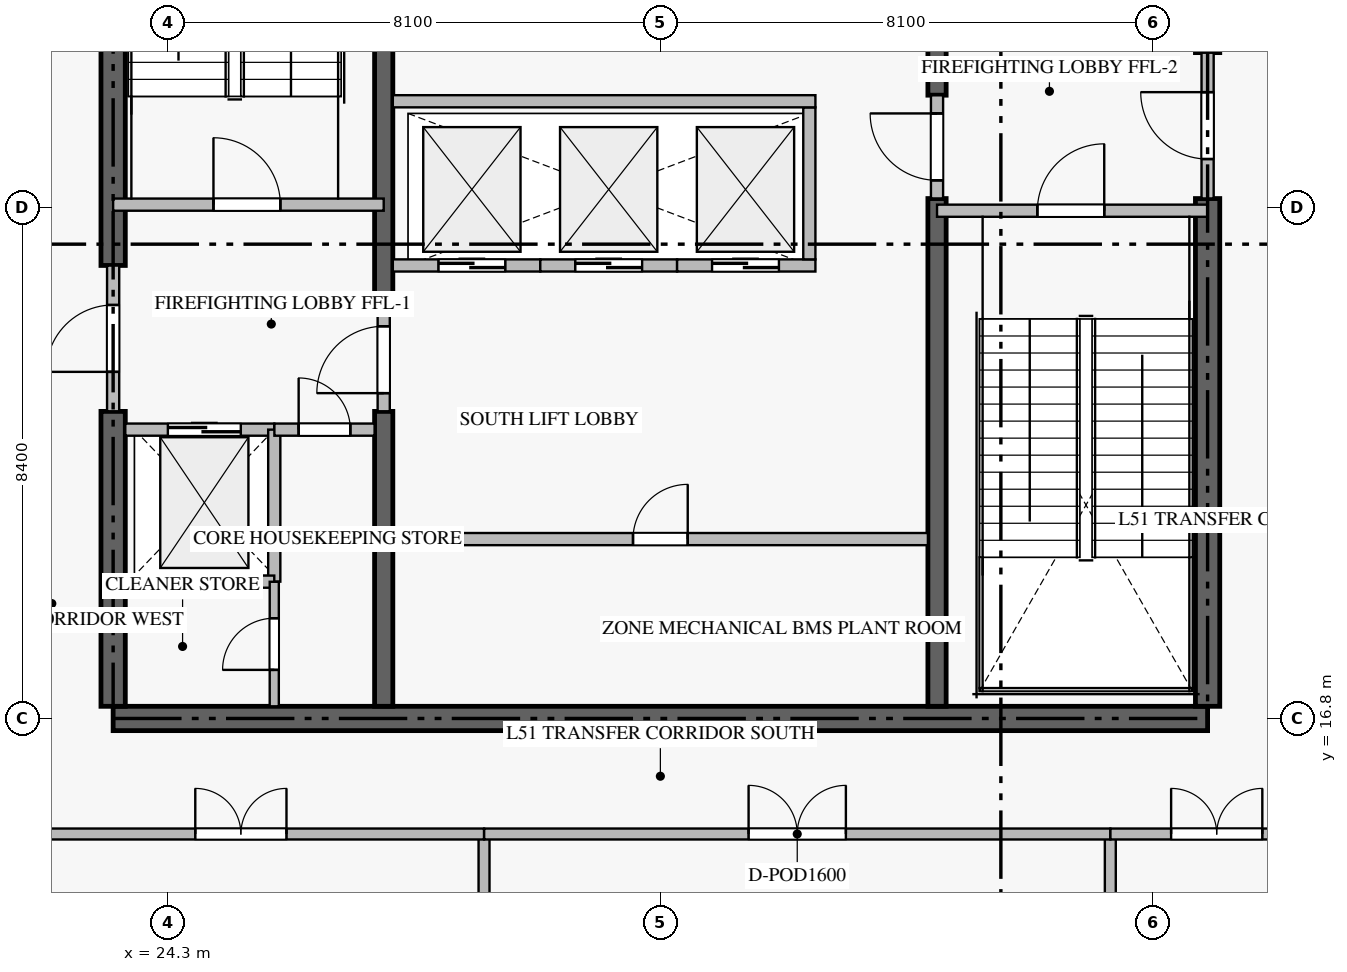
"""IFC4 building model, lengths in metres.
Left out: names, types, materials, properties, quantities, classifications, styles, units other than length and angle.
Written with IfcOpenShell. Run it as: python <this file> out.ifc"""

import sys

from ifc_helpers import new_model, si_unit, direction, frame, frame_2d, origin, place, context, subcontext, project, spatial, rectangle, extrude, source, transform, mapped, element, fill, save


model = new_model("IFC4")
c1 = context("Model", 3, precision=1e-05, world=origin(), true_north=direction((0.0, 1.0)))
c2 = subcontext(c1, "Body", "Model", "MODEL_VIEW")
j1 = project(units=[si_unit("LENGTHUNIT", "METRE"), si_unit("PLANEANGLEUNIT", "RADIAN")], contexts=[c1])
p1 = place(None, origin())
s1 = spatial("IfcSite", under=j1, at=p1, CompositionType="ELEMENT")
p2 = place(p1, origin())
s2 = spatial("IfcBuilding", under=s1, at=p2, CompositionType="ELEMENT")
p3 = place(p2, frame((0.0, 0.0, 204.9)))
s3 = spatial("IfcBuildingStorey", under=s2, at=p3, CompositionType="ELEMENT", Elevation=204.9)
p4 = place(p3, frame((23.4, 16.8, -0.36), z_axis=(0.0, 0.0, 1.0), x_axis=(1.0, 0.0, 0.0)))
e1 = element("IfcWall", 1, at=p4, inside=s3, PredefinedType="SHEAR", context=c2, shape_type="SweptSolid", body=[
    extrude(rectangle(XDim=18.0, YDim=0.4, at=frame_2d((9.0, 0.0))), origin(), (0.0, 0.0, 1.0), 5.468),
])
p5 = place(p3, frame((23.4, 17.0, -0.36), z_axis=(0.0, 0.0, 1.0), x_axis=(0.0, 1.0, 0.0)))
e2 = element("IfcWall", 2, at=p5, inside=s3, PredefinedType="SHEAR", context=c2, shape_type="SweptSolid", body=[
    extrude(rectangle(XDim=4.85, YDim=0.4, at=frame_2d((2.425, 0.0))), origin(), (0.0, 0.0, 1.0), 5.468),
])
p6 = place(p3, frame((23.4, 24.25, -0.36), z_axis=(0.0, 0.0, 1.0), x_axis=(0.0, 1.0, 0.0)))
e3 = element("IfcWall", 3, at=p6, inside=s3, PredefinedType="SHEAR", context=c2, shape_type="SweptSolid", body=[
    extrude(rectangle(XDim=9.15, YDim=0.4, at=frame_2d((4.575, 0.0))), origin(), (0.0, 0.0, 1.0), 5.468),
])
p7 = place(p3, frame((41.4, 17.0, -0.36), z_axis=(0.0, 0.0, 1.0), x_axis=(0.0, 1.0, 0.0)))
e4 = element("IfcWall", 4, at=p7, inside=s3, PredefinedType="SHEAR", context=c2, shape_type="SweptSolid", body=[
    extrude(rectangle(XDim=8.35, YDim=0.4, at=frame_2d((4.175, 0.0))), origin(), (0.0, 0.0, 1.0), 5.468),
])
p8 = place(p3, frame((27.85, 17.0, -0.36), z_axis=(0.0, 0.0, 1.0), x_axis=(0.0, 1.0, 0.0)))
e5 = element("IfcWall", 5, at=p8, inside=s3, PredefinedType="SHEAR", context=c2, shape_type="SweptSolid", body=[
    extrude(rectangle(XDim=4.85, YDim=0.3, at=frame_2d((2.425, 0.0))), origin(), (0.0, 0.0, 1.0), 5.468),
])
p9 = place(p3, frame((27.85, 23.55, -0.36), z_axis=(0.0, 0.0, 1.0), x_axis=(0.0, 1.0, 0.0)))
e6 = element("IfcWall", 6, at=p9, inside=s3, PredefinedType="SHEAR", context=c2, shape_type="SweptSolid", body=[
    extrude(rectangle(XDim=9.85, YDim=0.3, at=frame_2d((4.925, 0.0))), origin(), (0.0, 0.0, 1.0), 5.468),
])
p10 = place(p3, frame((36.95, 17.0, -0.36), z_axis=(0.0, 0.0, 1.0), x_axis=(0.0, 1.0, 0.0)))
e7 = element("IfcWall", 7, at=p10, inside=s3, PredefinedType="SHEAR", context=c2, shape_type="SweptSolid", body=[
    extrude(rectangle(XDim=8.35, YDim=0.3, at=frame_2d((4.175, 0.0))), origin(), (0.0, 0.0, 1.0), 5.468),
])
p11 = place(p3, frame((36.95, 27.05, -0.36), z_axis=(0.0, 0.0, 1.0), x_axis=(0.0, 1.0, 0.0)))
e8 = element("IfcWall", 8, at=p11, inside=s3, PredefinedType="SHEAR", context=c2, shape_type="SweptSolid", body=[
    extrude(rectangle(XDim=6.35, YDim=0.3, at=frame_2d((3.175, 0.0))), origin(), (0.0, 0.0, 1.0), 5.468),
])
p12 = place(p3, frame((23.4, 25.25, 0.0), z_axis=(0.0, 0.0, 1.0), x_axis=(1.0, 0.0, 0.0)))
e9 = element("IfcWall", 9, at=p12, inside=s3, PredefinedType="STANDARD", context=c2, shape_type="SweptSolid", body=[
    extrude(rectangle(XDim=4.45, YDim=0.2, at=frame_2d((2.225, 0.0))), origin(), (0.0, 0.0, 1.0), 5.11),
])
p13 = place(p12, frame((1.65, 0.0, 0.0)))
e10 = element("IfcOpeningElement", 10, at=p13, cuts=e9, PredefinedType="OPENING", context=c2, shape_type="SweptSolid", body=[
    extrude(rectangle(XDim=1.1, YDim=2.15, at=frame_2d((0.55, 1.075))), frame((0.0, 0.11, 0.0), z_axis=(0.0, -1.0, 0.0), x_axis=(1.0, 0.0, 0.0)), (0.0, 0.0, 1.0), 0.22),
])
p14 = place(p3, frame((36.95, 25.15, 0.0), z_axis=(0.0, 0.0, 1.0), x_axis=(1.0, 0.0, 0.0)))
e11 = element("IfcWall", 11, at=p14, inside=s3, PredefinedType="STANDARD", context=c2, shape_type="SweptSolid", body=[
    extrude(rectangle(XDim=4.45, YDim=0.2, at=frame_2d((2.225, 0.0))), origin(), (0.0, 0.0, 1.0), 5.11),
])
p15 = place(p14, frame((1.65, 0.0, 0.0)))
e12 = element("IfcOpeningElement", 12, at=p15, cuts=e11, PredefinedType="OPENING", context=c2, shape_type="SweptSolid", body=[
    extrude(rectangle(XDim=1.1, YDim=2.15, at=frame_2d((0.55, 1.075))), frame((0.0, 0.11, 0.0), z_axis=(0.0, -1.0, 0.0), x_axis=(1.0, 0.0, 0.0)), (0.0, 0.0, 1.0), 0.22),
])
p16 = place(p3, frame((23.6, 21.55, 0.0), z_axis=(0.0, 0.0, 1.0), x_axis=(1.0, 0.0, 0.0)))
e13 = element("IfcWall", 13, at=p16, inside=s3, PredefinedType="STANDARD", context=c2, shape_type="SweptSolid", body=[
    extrude(rectangle(XDim=2.45, YDim=0.2, at=frame_2d((1.225, 0.0))), origin(), (0.0, 0.0, 1.0), 5.11),
])
p17 = place(p16, frame((0.7, 0.0, 0.0)))
e14 = element("IfcOpeningElement", 14, at=p17, cuts=e13, PredefinedType="OPENING", context=c2, shape_type="SweptSolid", body=[
    extrude(rectangle(XDim=1.2, YDim=2.2, at=frame_2d((0.6, 1.1))), frame((0.0, 0.11, 0.0), z_axis=(0.0, -1.0, 0.0), x_axis=(1.0, 0.0, 0.0)), (0.0, 0.0, 1.0), 0.22),
])
p18 = place(p3, frame((28.0, 24.25, 0.0), z_axis=(0.0, 0.0, 1.0), x_axis=(1.0, 0.0, 0.0)))
e15 = element("IfcWall", 15, at=p18, inside=s3, PredefinedType="STANDARD", context=c2, shape_type="SweptSolid", body=[
    extrude(rectangle(XDim=2.425, YDim=0.2, at=frame_2d((1.212, 0.0))), origin(), (0.0, 0.0, 1.0), 5.11),
])
p19 = place(p18, frame((0.75, 0.0, 0.0)))
e16 = element("IfcOpeningElement", 16, at=p19, cuts=e15, PredefinedType="OPENING", context=c2, shape_type="SweptSolid", body=[
    extrude(rectangle(XDim=1.1, YDim=2.2, at=frame_2d((0.55, 1.1))), frame((0.0, 0.11, 0.0), z_axis=(0.0, -1.0, 0.0), x_axis=(1.0, 0.0, 0.0)), (0.0, 0.0, 1.0), 0.22),
])
p20 = place(p3, frame((30.425, 24.25, 0.0), z_axis=(0.0, 0.0, 1.0), x_axis=(1.0, 0.0, 0.0)))
e17 = element("IfcWall", 17, at=p20, inside=s3, PredefinedType="STANDARD", context=c2, shape_type="SweptSolid", body=[
    extrude(rectangle(XDim=2.25, YDim=0.2, at=frame_2d((1.125, 0.0))), origin(), (0.0, 0.0, 1.0), 5.11),
])
p21 = place(p20, frame((0.575, 0.0, 0.0)))
e18 = element("IfcOpeningElement", 18, at=p21, cuts=e17, PredefinedType="OPENING", context=c2, shape_type="SweptSolid", body=[
    extrude(rectangle(XDim=1.1, YDim=2.2, at=frame_2d((0.55, 1.1))), frame((0.0, 0.11, 0.0), z_axis=(0.0, -1.0, 0.0), x_axis=(1.0, 0.0, 0.0)), (0.0, 0.0, 1.0), 0.22),
])
p22 = place(p3, frame((32.675, 24.25, 0.0), z_axis=(0.0, 0.0, 1.0), x_axis=(1.0, 0.0, 0.0)))
e19 = element("IfcWall", 19, at=p22, inside=s3, PredefinedType="STANDARD", context=c2, shape_type="SweptSolid", body=[
    extrude(rectangle(XDim=2.275, YDim=0.2, at=frame_2d((1.137, 0.0))), origin(), (0.0, 0.0, 1.0), 5.11),
])
p23 = place(p22, frame((0.575, 0.0, 0.0)))
e20 = element("IfcOpeningElement", 20, at=p23, cuts=e19, PredefinedType="OPENING", context=c2, shape_type="SweptSolid", body=[
    extrude(rectangle(XDim=1.1, YDim=2.2, at=frame_2d((0.55, 1.1))), frame((0.0, 0.11, 0.0), z_axis=(0.0, -1.0, 0.0), x_axis=(1.0, 0.0, 0.0)), (0.0, 0.0, 1.0), 0.22),
])
for number, where, z_axis, x_axis in (
    (21, (34.85, 24.35, 0.0), (0.0, 0.0, 1.0), (0.0, 1.0, 0.0)),
    (22, (26.05, 19.05, 0.0), (0.0, 0.0, 1.0), (0.0, 1.0, 0.0)),
):
    element("IfcWall", number, at=place(p3, frame(where, z_axis=z_axis, x_axis=x_axis)), inside=s3, PredefinedType="STANDARD", context=c2, shape_type="SweptSolid", body=[
        extrude(rectangle(XDim=2.5, YDim=0.2, at=frame_2d((1.25, 0.0))), origin(), (0.0, 0.0, 1.0), 5.11),
    ])
p24 = place(p3, frame((23.6, 19.05, 0.0), z_axis=(0.0, 0.0, 1.0), x_axis=(1.0, 0.0, 0.0)))
e23 = element("IfcWall", 23, at=p24, inside=s3, PredefinedType="STANDARD", context=c2, shape_type="SweptSolid", body=[
    extrude(rectangle(XDim=2.45, YDim=0.2, at=frame_2d((1.225, 0.0))), origin(), (0.0, 0.0, 1.0), 5.11),
])
p25 = place(p3, frame((26.052, 21.55, 0.0), z_axis=(0.0, 0.0, 1.0), x_axis=(1.0, 0.0, 0.0)))
e24 = element("IfcWall", 24, at=p25, inside=s3, PredefinedType="STANDARD", context=c2, shape_type="SweptSolid", body=[
    extrude(rectangle(XDim=1.648, YDim=0.2, at=frame_2d((0.824, 0.0))), origin(), (0.0, 0.0, 1.0), 5.11),
])
p26 = place(p25, frame((0.399, 0.0, 0.0)))
e25 = element("IfcOpeningElement", 25, at=p26, cuts=e24, PredefinedType="OPENING", context=c2, shape_type="SweptSolid", body=[
    extrude(rectangle(XDim=0.85, YDim=2.1, at=frame_2d((0.425, 1.05))), frame((0.0, 0.11, 0.0), z_axis=(0.0, -1.0, 0.0), x_axis=(1.0, 0.0, 0.0)), (0.0, 0.0, 1.0), 0.22),
])
p27 = place(p3, frame((23.4, 21.852, 0.0), z_axis=(0.0, 0.0, 1.0), x_axis=(0.0, 1.0, 0.0)))
e26 = element("IfcWall", 26, at=p27, inside=s3, PredefinedType="STANDARD", context=c2, shape_type="SweptSolid", body=[
    extrude(rectangle(XDim=2.396, YDim=0.2, at=frame_2d((1.198, 0.0))), origin(), (0.0, 0.0, 1.0), 5.11),
])
p28 = place(p27, frame((0.648, 0.0, 0.0)))
e27 = element("IfcOpeningElement", 27, at=p28, cuts=e26, PredefinedType="OPENING", context=c2, shape_type="SweptSolid", body=[
    extrude(rectangle(XDim=1.1, YDim=2.15, at=frame_2d((0.55, 1.075))), frame((0.0, 0.11, 0.0), z_axis=(0.0, -1.0, 0.0), x_axis=(1.0, 0.0, 0.0)), (0.0, 0.0, 1.0), 0.22),
])
p29 = place(p3, frame((41.4, 25.352, 0.0), z_axis=(0.0, 0.0, 1.0), x_axis=(0.0, 1.0, 0.0)))
e28 = element("IfcWall", 28, at=p29, inside=s3, PredefinedType="STANDARD", context=c2, shape_type="SweptSolid", body=[
    extrude(rectangle(XDim=2.396, YDim=0.2, at=frame_2d((1.198, 0.0))), origin(), (0.0, 0.0, 1.0), 5.11),
])
p30 = place(p29, frame((0.648, 0.0, 0.0)))
e29 = element("IfcOpeningElement", 29, at=p30, cuts=e28, PredefinedType="OPENING", context=c2, shape_type="SweptSolid", body=[
    extrude(rectangle(XDim=1.1, YDim=2.15, at=frame_2d((0.55, 1.075))), frame((0.0, 0.11, 0.0), z_axis=(0.0, -1.0, 0.0), x_axis=(1.0, 0.0, 0.0)), (0.0, 0.0, 1.0), 0.22),
])
p31 = place(p3, frame((27.85, 21.852, 0.0), z_axis=(0.0, 0.0, 1.0), x_axis=(0.0, 1.0, 0.0)))
e30 = element("IfcWall", 30, at=p31, inside=s3, PredefinedType="STANDARD", context=c2, shape_type="SweptSolid", body=[
    extrude(rectangle(XDim=1.696, YDim=0.2, at=frame_2d((0.848, 0.0))), origin(), (0.0, 0.0, 1.0), 5.11),
])
p32 = place(p31, frame((0.298, 0.0, 0.0)))
e31 = element("IfcOpeningElement", 31, at=p32, cuts=e30, PredefinedType="OPENING", context=c2, shape_type="SweptSolid", body=[
    extrude(rectangle(XDim=1.1, YDim=2.15, at=frame_2d((0.55, 1.075))), frame((0.0, 0.11, 0.0), z_axis=(0.0, -1.0, 0.0), x_axis=(1.0, 0.0, 0.0)), (0.0, 0.0, 1.0), 0.22),
])
p33 = place(p3, frame((36.95, 25.352, 0.0), z_axis=(0.0, 0.0, 1.0), x_axis=(0.0, 1.0, 0.0)))
e32 = element("IfcWall", 32, at=p33, inside=s3, PredefinedType="STANDARD", context=c2, shape_type="SweptSolid", body=[
    extrude(rectangle(XDim=1.696, YDim=0.2, at=frame_2d((0.848, 0.0))), origin(), (0.0, 0.0, 1.0), 5.11),
])
p34 = place(p33, frame((0.298, 0.0, 0.0)))
e33 = element("IfcOpeningElement", 33, at=p34, cuts=e32, PredefinedType="OPENING", context=c2, shape_type="SweptSolid", body=[
    extrude(rectangle(XDim=1.1, YDim=2.15, at=frame_2d((0.55, 1.075))), frame((0.0, 0.11, 0.0), z_axis=(0.0, -1.0, 0.0), x_axis=(1.0, 0.0, 0.0)), (0.0, 0.0, 1.0), 0.22),
])
p35 = place(p3, frame((28.0, 26.95, 0.0), z_axis=(0.0, 0.0, 1.0), x_axis=(1.0, 0.0, 0.0)))
e34 = element("IfcWall", 34, at=p35, inside=s3, PredefinedType="STANDARD", context=c2, shape_type="SweptSolid", body=[
    extrude(rectangle(XDim=6.95, YDim=0.2, at=frame_2d((3.475, 0.0))), origin(), (0.0, 0.0, 1.0), 5.11),
])
p36 = place(p3, frame((26.05, 17.0, 0.0), z_axis=(0.0, 0.0, 1.0), x_axis=(0.0, 1.0, 0.0)))
e35 = element("IfcWall", 35, at=p36, inside=s3, PredefinedType="PARTITIONING", context=c2, shape_type="SweptSolid", body=[
    extrude(rectangle(XDim=2.048, YDim=0.15, at=frame_2d((1.024, 0.0))), origin(), (0.0, 0.0, 1.0), 5.11),
])
p37 = place(p36, frame((0.599, 0.0, 0.0)))
e36 = element("IfcOpeningElement", 36, at=p37, cuts=e35, PredefinedType="OPENING", context=c2, shape_type="SweptSolid", body=[
    extrude(rectangle(XDim=0.85, YDim=2.1, at=frame_2d((0.425, 1.05))), frame((0.0, 0.085, 0.0), z_axis=(0.0, -1.0, 0.0), x_axis=(1.0, 0.0, 0.0)), (0.0, 0.0, 1.0), 0.17),
])
p38 = place(p3, frame((28.0, 19.75, 0.0), z_axis=(0.0, 0.0, 1.0), x_axis=(1.0, 0.0, 0.0)))
e37 = element("IfcWall", 37, at=p38, inside=s3, PredefinedType="STANDARD", context=c2, shape_type="SweptSolid", body=[
    extrude(rectangle(XDim=8.8, YDim=0.2, at=frame_2d((4.4, 0.0))), origin(), (0.0, 0.0, 1.0), 5.11),
])
p39 = place(p38, frame((3.95, 0.0, 0.0)))
e38 = element("IfcOpeningElement", 38, at=p39, cuts=e37, PredefinedType="OPENING", context=c2, shape_type="SweptSolid", body=[
    extrude(rectangle(XDim=0.9, YDim=2.1, at=frame_2d((0.45, 1.05))), frame((0.0, 0.11, 0.0), z_axis=(0.0, -1.0, 0.0), x_axis=(1.0, 0.0, 0.0)), (0.0, 0.0, 1.0), 0.22),
])
for number, where, z_axis, x_axis in (
    (39, (29.5, 2.282, 0.0), (0.0, 0.0, 1.0), (0.0, 1.0, 0.0)),
    (40, (39.8, 2.282, 0.0), (0.0, 0.0, 1.0), (0.0, 1.0, 0.0)),
):
    element("IfcWall", number, at=place(p3, frame(where, z_axis=z_axis, x_axis=x_axis)), inside=s3, PredefinedType="PARTITIONING", context=c2, shape_type="SweptSolid", body=[
        extrude(rectangle(XDim=12.618, YDim=0.18, at=frame_2d((6.309, 0.0))), origin(), (0.0, 0.0, 1.0), 5.11),
    ])
p40 = place(p3, frame((21.502, 14.9, 0.0), z_axis=(0.0, 0.0, 1.0), x_axis=(1.0, 0.0, 0.0)))
e41 = element("IfcWall", 41, at=p40, inside=s3, PredefinedType="PARTITIONING", context=c2, shape_type="SweptSolid", body=[
    extrude(rectangle(XDim=7.998, YDim=0.18, at=frame_2d((3.999, 0.0))), origin(), (0.0, 0.0, 1.0), 5.11),
])
p41 = place(p40, frame((3.249, 0.0, 0.0)))
e42 = element("IfcOpeningElement", 42, at=p41, cuts=e41, PredefinedType="OPENING", context=c2, shape_type="SweptSolid", body=[
    extrude(rectangle(XDim=1.5, YDim=2.25, at=frame_2d((0.75, 1.125))), frame((0.0, 0.1, 0.0), z_axis=(0.0, -1.0, 0.0), x_axis=(1.0, 0.0, 0.0)), (0.0, 0.0, 1.0), 0.2),
])
p42 = place(p3, frame((29.502, 14.9, 0.0), z_axis=(0.0, 0.0, 1.0), x_axis=(1.0, 0.0, 0.0)))
e43 = element("IfcWall", 43, at=p42, inside=s3, PredefinedType="PARTITIONING", context=c2, shape_type="SweptSolid", body=[
    extrude(rectangle(XDim=10.298, YDim=0.18, at=frame_2d((5.149, 0.0))), origin(), (0.0, 0.0, 1.0), 5.11),
])
p43 = place(p42, frame((4.349, 0.0, 0.0)))
e44 = element("IfcOpeningElement", 44, at=p43, cuts=e43, PredefinedType="OPENING", context=c2, shape_type="SweptSolid", body=[
    extrude(rectangle(XDim=1.6, YDim=2.3, at=frame_2d((0.8, 1.15))), frame((0.0, 0.1, 0.0), z_axis=(0.0, -1.0, 0.0), x_axis=(1.0, 0.0, 0.0)), (0.0, 0.0, 1.0), 0.2),
])
p44 = place(p3, frame((39.802, 14.9, 0.0), z_axis=(0.0, 0.0, 1.0), x_axis=(1.0, 0.0, 0.0)))
e45 = element("IfcWall", 45, at=p44, inside=s3, PredefinedType="PARTITIONING", context=c2, shape_type="SweptSolid", body=[
    extrude(rectangle(XDim=3.496, YDim=0.18, at=frame_2d((1.748, 0.0))), origin(), (0.0, 0.0, 1.0), 5.11),
])
p45 = place(p44, frame((0.998, 0.0, 0.0)))
e46 = element("IfcOpeningElement", 46, at=p45, cuts=e45, PredefinedType="OPENING", context=c2, shape_type="SweptSolid", body=[
    extrude(rectangle(XDim=1.5, YDim=2.25, at=frame_2d((0.75, 1.125))), frame((0.0, 0.1, 0.0), z_axis=(0.0, -1.0, 0.0), x_axis=(1.0, 0.0, 0.0)), (0.0, 0.0, 1.0), 0.2),
])
m1 = source(origin(), c2, "Body", "SweptSolid", [
    extrude(rectangle(XDim=1.1, YDim=2.15, at=frame_2d((0.55, 1.075))), frame((0.0, 0.025, 0.0), z_axis=(0.0, -1.0, 0.0), x_axis=(1.0, 0.0, 0.0)), (0.0, 0.0, 1.0), 0.05),
])
p46 = place(p13, origin())
e47 = element("IfcDoor", 47, at=p46, inside=s3, OperationType="SINGLE_SWING_LEFT", PredefinedType="DOOR", context=c2, shape_type="MappedRepresentation", body=[
    mapped(m1, transform((0.0, 0.0, 0.0), scale=1.0)),
])
fill(e10, e47)
p47 = place(p15, origin())
e48 = element("IfcDoor", 48, at=p47, inside=s3, OperationType="SINGLE_SWING_RIGHT", PredefinedType="DOOR", context=c2, shape_type="MappedRepresentation", body=[
    mapped(m1, transform((0.0, 0.0, 0.0), scale=1.0)),
])
fill(e12, e48)
m2 = source(origin(), c2, "Body", "SweptSolid", [
    extrude(rectangle(XDim=1.2, YDim=2.2, at=frame_2d((0.6, 1.1))), frame((0.0, 0.025, 0.0), z_axis=(0.0, -1.0, 0.0), x_axis=(1.0, 0.0, 0.0)), (0.0, 0.0, 1.0), 0.05),
])
p48 = place(p17, origin())
e49 = element("IfcDoor", 49, at=p48, inside=s3, OperationType="DOUBLE_DOOR_SLIDING", PredefinedType="DOOR", context=c2, shape_type="MappedRepresentation", body=[
    mapped(m2, transform((0.0, 0.0, 0.0), scale=1.0)),
])
fill(e14, e49)
m3 = source(origin(), c2, "Body", "SweptSolid", [
    extrude(rectangle(XDim=1.1, YDim=2.2, at=frame_2d((0.55, 1.1))), frame((0.0, 0.025, 0.0), z_axis=(0.0, -1.0, 0.0), x_axis=(1.0, 0.0, 0.0)), (0.0, 0.0, 1.0), 0.05),
])
p49 = place(p19, origin())
e50 = element("IfcDoor", 50, at=p49, inside=s3, OperationType="DOUBLE_DOOR_SLIDING", PredefinedType="DOOR", context=c2, shape_type="MappedRepresentation", body=[
    mapped(m3, transform((0.0, 0.0, 0.0), scale=1.0)),
])
fill(e16, e50)
p50 = place(p21, origin())
e51 = element("IfcDoor", 51, at=p50, inside=s3, OperationType="DOUBLE_DOOR_SLIDING", PredefinedType="DOOR", context=c2, shape_type="MappedRepresentation", body=[
    mapped(m3, transform((0.0, 0.0, 0.0), scale=1.0)),
])
fill(e18, e51)
p51 = place(p23, origin())
e52 = element("IfcDoor", 52, at=p51, inside=s3, OperationType="DOUBLE_DOOR_SLIDING", PredefinedType="DOOR", context=c2, shape_type="MappedRepresentation", body=[
    mapped(m3, transform((0.0, 0.0, 0.0), scale=1.0)),
])
fill(e20, e52)
m4 = source(origin(), c2, "Body", "SweptSolid", [
    extrude(rectangle(XDim=0.85, YDim=2.1, at=frame_2d((0.425, 1.05))), frame((0.0, 0.025, 0.0), z_axis=(0.0, -1.0, 0.0), x_axis=(1.0, 0.0, 0.0)), (0.0, 0.0, 1.0), 0.05),
])
p52 = place(p26, origin())
e53 = element("IfcDoor", 53, at=p52, inside=s3, OperationType="SINGLE_SWING_LEFT", PredefinedType="DOOR", context=c2, shape_type="MappedRepresentation", body=[
    mapped(m4, transform((0.0, 0.0, 0.0), scale=1.0)),
])
fill(e25, e53)
p53 = place(p28, origin())
e54 = element("IfcDoor", 54, at=p53, inside=s3, OperationType="SINGLE_SWING_LEFT", PredefinedType="DOOR", context=c2, shape_type="MappedRepresentation", body=[
    mapped(m1, transform((0.0, 0.0, 0.0), scale=1.0)),
])
fill(e27, e54)
p54 = place(p30, origin())
e55 = element("IfcDoor", 55, at=p54, inside=s3, OperationType="SINGLE_SWING_RIGHT", PredefinedType="DOOR", context=c2, shape_type="MappedRepresentation", body=[
    mapped(m1, transform((0.0, 0.0, 0.0), scale=1.0)),
])
fill(e29, e55)
p55 = place(p32, origin())
e56 = element("IfcDoor", 56, at=p55, inside=s3, OperationType="SINGLE_SWING_LEFT", PredefinedType="DOOR", context=c2, shape_type="MappedRepresentation", body=[
    mapped(m1, transform((0.0, 0.0, 0.0), scale=1.0)),
])
fill(e31, e56)
p56 = place(p34, origin())
e57 = element("IfcDoor", 57, at=p56, inside=s3, OperationType="SINGLE_SWING_RIGHT", PredefinedType="DOOR", context=c2, shape_type="MappedRepresentation", body=[
    mapped(m1, transform((0.0, 0.0, 0.0), scale=1.0)),
])
fill(e33, e57)
p57 = place(p37, origin())
e58 = element("IfcDoor", 58, at=p57, inside=s3, OperationType="SINGLE_SWING_LEFT", PredefinedType="DOOR", context=c2, shape_type="MappedRepresentation", body=[
    mapped(m4, transform((0.0, 0.0, 0.0), scale=1.0)),
])
fill(e36, e58)
m5 = source(origin(), c2, "Body", "SweptSolid", [
    extrude(rectangle(XDim=0.9, YDim=2.1, at=frame_2d((0.45, 1.05))), frame((0.0, 0.025, 0.0), z_axis=(0.0, -1.0, 0.0), x_axis=(1.0, 0.0, 0.0)), (0.0, 0.0, 1.0), 0.05),
])
p58 = place(p39, origin())
e59 = element("IfcDoor", 59, at=p58, inside=s3, OperationType="SINGLE_SWING_RIGHT", PredefinedType="DOOR", context=c2, shape_type="MappedRepresentation", body=[
    mapped(m5, transform((0.0, 0.0, 0.0), scale=1.0)),
])
fill(e38, e59)
m6 = source(origin(), c2, "Body", "SweptSolid", [
    extrude(rectangle(XDim=1.5, YDim=2.25, at=frame_2d((0.75, 1.125))), frame((0.0, 0.025, 0.0), z_axis=(0.0, -1.0, 0.0), x_axis=(1.0, 0.0, 0.0)), (0.0, 0.0, 1.0), 0.05),
])
p59 = place(p41, origin())
e60 = element("IfcDoor", 60, at=p59, inside=s3, OperationType="DOUBLE_DOOR_SINGLE_SWING", PredefinedType="DOOR", context=c2, shape_type="MappedRepresentation", body=[
    mapped(m6, transform((0.0, 0.0, 0.0), scale=1.0)),
])
fill(e42, e60)
m7 = source(origin(), c2, "Body", "SweptSolid", [
    extrude(rectangle(XDim=1.6, YDim=2.3, at=frame_2d((0.8, 1.15))), frame((0.0, 0.025, 0.0), z_axis=(0.0, -1.0, 0.0), x_axis=(1.0, 0.0, 0.0)), (0.0, 0.0, 1.0), 0.05),
])
p60 = place(p43, origin())
e61 = element("IfcDoor", 61, at=p60, inside=s3, OperationType="DOUBLE_DOOR_SINGLE_SWING", PredefinedType="DOOR", context=c2, shape_type="MappedRepresentation", body=[
    mapped(m7, transform((0.0, 0.0, 0.0), scale=1.0)),
])
fill(e44, e61)
p61 = place(p45, origin())
e62 = element("IfcDoor", 62, at=p61, inside=s3, OperationType="DOUBLE_DOOR_SINGLE_SWING", PredefinedType="DOOR", context=c2, shape_type="MappedRepresentation", body=[
    mapped(m6, transform((0.0, 0.0, 0.0), scale=1.0)),
])
fill(e46, e62)
save(model, sys.argv[1])
